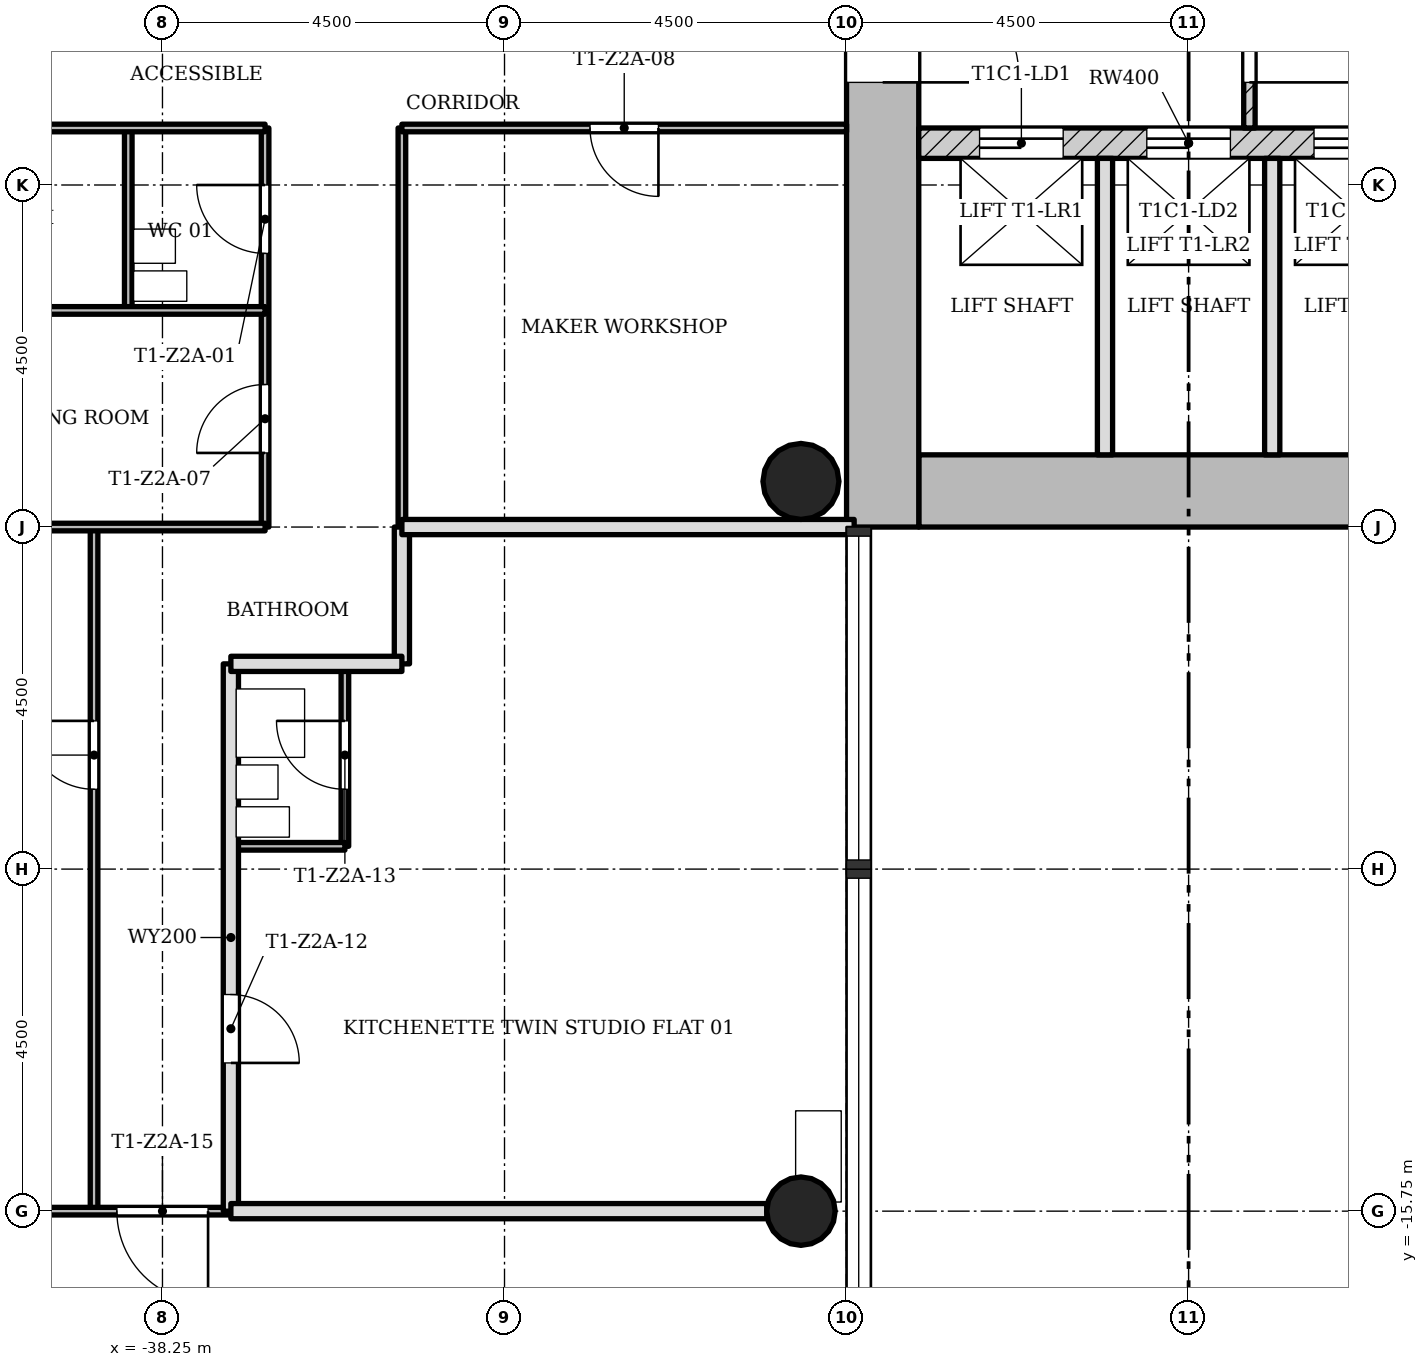
"""IFC4 building model, lengths in metres.
Left out: names, types, materials, properties, quantities, classifications, styles, units other than length and angle.
Written with IfcOpenShell. Run it as: python <this file> out.ifc"""

import sys

from ifc_helpers import new_model, si_unit, direction, frame, frame_2d, origin, origin_2d, place, context, subcontext, project, spatial, rectangle, hollow_circle, extrude, element, fill, save


model = new_model("IFC4")
c1 = context("Model", 3, precision=1e-05, world=origin(), true_north=direction((0.0, 1.0)))
c2 = subcontext(c1, "Body", "Model", "MODEL_VIEW")
j1 = project(units=[si_unit("LENGTHUNIT", "METRE"), si_unit("PLANEANGLEUNIT", "RADIAN")], contexts=[c1])
p1 = place(None, origin())
s1 = spatial("IfcSite", under=j1, at=p1, CompositionType="ELEMENT")
p2 = place(p1, origin())
s2 = spatial("IfcBuilding", under=s1, at=p2, CompositionType="ELEMENT")
p3 = place(p2, frame((0.0, 0.0, 117.4)))
s3 = spatial("IfcBuildingStorey", under=s2, at=p3, CompositionType="ELEMENT", Elevation=117.4)
p4 = place(p3, frame((-28.3, -6.275, 0.0), z_axis=(0.0, 0.0, 1.0), x_axis=(1.0, 0.0, 0.0)))
e1 = element("IfcWall", 1, at=p4, inside=s3, PredefinedType="SHEAR", context=c2, shape_type="SweptSolid", body=[
    extrude(rectangle(XDim=8.05, YDim=0.95, at=frame_2d((4.025, 0.0))), origin(), (0.0, 0.0, 1.0), 3.4),
])
p5 = place(p3, frame((-28.775, 5.8, 0.0), z_axis=(0.0, 0.0, 1.0), x_axis=(0.0, -1.0, 0.0)))
e2 = element("IfcWall", 2, at=p5, inside=s3, PredefinedType="SHEAR", context=c2, shape_type="SweptSolid", body=[
    extrude(rectangle(XDim=12.55, YDim=0.95, at=frame_2d((6.275, 0.0))), origin(), (0.0, 0.0, 1.0), 3.4),
])
p6 = place(p5, frame((4.9, 0.0, 0.0)))
e3 = element("IfcOpeningElement", 3, at=p6, cuts=e2, PredefinedType="OPENING", context=c2, shape_type="SweptSolid", body=[
    extrude(rectangle(XDim=1.8, YDim=2.1, at=frame_2d((0.9, 1.05))), frame((0.0, 0.485, 0.0), z_axis=(0.0, -1.0, 0.0), x_axis=(1.0, 0.0, 0.0)), (0.0, 0.0, 1.0), 0.97),
])
p7 = place(p3, frame((-28.3, -1.7, 0.0), z_axis=(0.0, 0.0, 1.0), x_axis=(1.0, 0.0, 0.0)))
e4 = element("IfcWall", 4, at=p7, inside=s3, PredefinedType="SHEAR", context=c2, shape_type="SweptSolid", body=[
    extrude(rectangle(XDim=7.1, YDim=0.4, at=frame_2d((3.55, 0.0))), origin(), (0.0, 0.0, 1.0), 3.4),
])
p8 = place(p7, frame((0.8, 0.0, 0.0)))
e5 = element("IfcOpeningElement", 5, at=p8, cuts=e4, PredefinedType="OPENING", context=c2, shape_type="SweptSolid", body=[
    extrude(rectangle(XDim=1.1, YDim=2.1, at=frame_2d((0.55, 1.05))), frame((0.0, 0.21, 0.0), z_axis=(0.0, -1.0, 0.0), x_axis=(1.0, 0.0, 0.0)), (0.0, 0.0, 1.0), 0.42),
])
p9 = place(p7, frame((3.0, 0.0, 0.0)))
e6 = element("IfcOpeningElement", 6, at=p9, cuts=e4, PredefinedType="OPENING", context=c2, shape_type="SweptSolid", body=[
    extrude(rectangle(XDim=1.1, YDim=2.1, at=frame_2d((0.55, 1.05))), frame((0.0, 0.21, 0.0), z_axis=(0.0, -1.0, 0.0), x_axis=(1.0, 0.0, 0.0)), (0.0, 0.0, 1.0), 0.42),
])
p10 = place(p7, frame((5.2, 0.0, 0.0)))
e7 = element("IfcOpeningElement", 7, at=p10, cuts=e4, PredefinedType="OPENING", context=c2, shape_type="SweptSolid", body=[
    extrude(rectangle(XDim=1.1, YDim=2.1, at=frame_2d((0.55, 1.05))), frame((0.0, 0.21, 0.0), z_axis=(0.0, -1.0, 0.0), x_axis=(1.0, 0.0, 0.0)), (0.0, 0.0, 1.0), 0.42),
])
p11 = place(p3, frame((-29.85, -15.75, 0.0), z_axis=(0.0, 0.0, 1.0), x_axis=(1.0, 0.0, 0.0)))
e8 = element("IfcColumn", 8, at=p11, inside=s3, PredefinedType="COLUMN", context=c2, shape_type="SweptSolid", body=[
    extrude(hollow_circle(Radius=0.45, WallThickness=0.032, at=origin_2d()), origin(), (0.0, 0.0, 1.0), 3.4),
])
p12 = place(p3, frame((-29.85, -6.15, 0.0), z_axis=(0.0, 0.0, 1.0), x_axis=(1.0, 0.0, 0.0)))
e9 = element("IfcColumn", 9, at=p12, inside=s3, PredefinedType="COLUMN", context=c2, shape_type="SweptSolid", body=[
    extrude(hollow_circle(Radius=0.5, WallThickness=0.036, at=origin_2d()), origin(), (0.0, 0.0, 1.0), 3.4),
])
p13 = place(p3, frame((-23.95, -1.5, 0.0), z_axis=(0.0, 0.0, 1.0), x_axis=(0.0, 1.0, 0.0)))
e10 = element("IfcWall", 10, at=p13, inside=s3, PredefinedType="PARTITIONING", context=c2, shape_type="SweptSolid", body=[
    extrude(rectangle(XDim=3.0, YDim=0.15, at=frame_2d((1.5, 0.0))), origin(), (0.0, 0.0, 1.0), 3.0),
])
p14 = place(p13, frame((0.6, 0.0, 0.0)))
e11 = element("IfcOpeningElement", 11, at=p14, cuts=e10, PredefinedType="OPENING", context=c2, shape_type="SweptSolid", body=[
    extrude(rectangle(XDim=1.8, YDim=2.1, at=frame_2d((0.9, 1.05))), frame((0.0, 0.085, 0.0), z_axis=(0.0, -1.0, 0.0), x_axis=(1.0, 0.0, 0.0)), (0.0, 0.0, 1.0), 0.17),
])
for number, where, z_axis, x_axis in (
    (12, (-25.85, -5.8, 0.0), (0.0, 0.0, 1.0), (0.0, 1.0, 0.0)),
    (13, (-23.65, -5.8, 0.0), (0.0, 0.0, 1.0), (0.0, 1.0, 0.0)),
):
    element("IfcWall", number, at=place(p3, frame(where, z_axis=z_axis, x_axis=x_axis)), inside=s3, PredefinedType="SOLIDWALL", context=c2, shape_type="SweptSolid", body=[
        extrude(rectangle(XDim=3.9, YDim=0.2, at=frame_2d((1.95, 0.0))), origin(), (0.0, 0.0, 1.0), 3.0),
    ])
p15 = place(p3, frame((-39.15, -15.75, 0.0), z_axis=(0.0, 0.0, 1.0), x_axis=(0.0, 1.0, 0.0)))
e14 = element("IfcWall", 14, at=p15, inside=s3, PredefinedType="PARTITIONING", context=c2, shape_type="SweptSolid", body=[
    extrude(rectangle(XDim=9.0, YDim=0.1, at=frame_2d((4.5, 0.0))), origin(), (0.0, 0.0, 1.0), 3.0),
])
p16 = place(p15, frame((5.55, 0.0, 0.0)))
e15 = element("IfcOpeningElement", 15, at=p16, cuts=e14, PredefinedType="OPENING", context=c2, shape_type="SweptSolid", body=[
    extrude(rectangle(XDim=0.9, YDim=2.1, at=frame_2d((0.45, 1.05))), frame((0.0, 0.06, 0.0), z_axis=(0.0, -1.0, 0.0), x_axis=(1.0, 0.0, 0.0)), (0.0, 0.0, 1.0), 0.12),
])
p17 = place(p3, frame((-38.7, -3.9, 0.0), z_axis=(0.0, 0.0, 1.0), x_axis=(0.0, 1.0, 0.0)))
e16 = element("IfcWall", 16, at=p17, inside=s3, PredefinedType="PARTITIONING", context=c2, shape_type="SweptSolid", body=[
    extrude(rectangle(XDim=2.4, YDim=0.1, at=frame_2d((1.2, 0.0))), origin(), (0.0, 0.0, 1.0), 3.0),
])
p18 = place(p3, frame((-37.35, -15.75, 0.0), z_axis=(0.0, 0.0, 1.0), x_axis=(0.0, 1.0, 0.0)))
e17 = element("IfcWall", 17, at=p18, inside=s3, PredefinedType="SOLIDWALL", context=c2, shape_type="SweptSolid", body=[
    extrude(rectangle(XDim=7.2, YDim=0.2, at=frame_2d((3.6, 0.0))), origin(), (0.0, 0.0, 1.0), 3.0),
])
p19 = place(p18, frame((1.95, 0.0, 0.0)))
e18 = element("IfcOpeningElement", 18, at=p19, cuts=e17, PredefinedType="OPENING", context=c2, shape_type="SweptSolid", body=[
    extrude(rectangle(XDim=0.9, YDim=2.1, at=frame_2d((0.45, 1.05))), frame((0.0, 0.11, 0.0), z_axis=(0.0, -1.0, 0.0), x_axis=(1.0, 0.0, 0.0)), (0.0, 0.0, 1.0), 0.22),
])
p20 = place(p3, frame((-36.9, -6.75, 0.0), z_axis=(0.0, 0.0, 1.0), x_axis=(0.0, 1.0, 0.0)))
e19 = element("IfcWall", 19, at=p20, inside=s3, PredefinedType="PARTITIONING", context=c2, shape_type="SweptSolid", body=[
    extrude(rectangle(XDim=5.25, YDim=0.1, at=frame_2d((2.625, 0.0))), origin(), (0.0, 0.0, 1.0), 3.0),
])
p21 = place(p20, frame((3.6, 0.0, 0.0)))
e20 = element("IfcOpeningElement", 20, at=p21, cuts=e19, PredefinedType="OPENING", context=c2, shape_type="SweptSolid", body=[
    extrude(rectangle(XDim=0.9, YDim=2.1, at=frame_2d((0.45, 1.05))), frame((0.0, 0.06, 0.0), z_axis=(0.0, -1.0, 0.0), x_axis=(1.0, 0.0, 0.0)), (0.0, 0.0, 1.0), 0.12),
])
p22 = place(p20, frame((0.975, 0.0, 0.0)))
e21 = element("IfcOpeningElement", 21, at=p22, cuts=e19, PredefinedType="OPENING", context=c2, shape_type="SweptSolid", body=[
    extrude(rectangle(XDim=0.9, YDim=2.1, at=frame_2d((0.45, 1.05))), frame((0.0, 0.06, 0.0), z_axis=(0.0, -1.0, 0.0), x_axis=(1.0, 0.0, 0.0)), (0.0, 0.0, 1.0), 0.12),
])
p23 = place(p3, frame((-35.85, -10.95, 0.0), z_axis=(0.0, 0.0, 1.0), x_axis=(0.0, 1.0, 0.0)))
e22 = element("IfcWall", 22, at=p23, inside=s3, PredefinedType="PARTITIONING", context=c2, shape_type="SweptSolid", body=[
    extrude(rectangle(XDim=2.4, YDim=0.1, at=frame_2d((1.2, 0.0))), origin(), (0.0, 0.0, 1.0), 3.0),
])
p24 = place(p23, frame((0.75, 0.0, 0.0)))
e23 = element("IfcOpeningElement", 23, at=p24, cuts=e22, PredefinedType="OPENING", context=c2, shape_type="SweptSolid", body=[
    extrude(rectangle(XDim=0.9, YDim=2.1, at=frame_2d((0.45, 1.05))), frame((0.0, 0.06, 0.0), z_axis=(0.0, -1.0, 0.0), x_axis=(1.0, 0.0, 0.0)), (0.0, 0.0, 1.0), 0.12),
])
p25 = place(p3, frame((-35.1, -6.75, 0.0), z_axis=(0.0, 0.0, 1.0), x_axis=(0.0, 1.0, 0.0)))
e24 = element("IfcWall", 24, at=p25, inside=s3, PredefinedType="PARTITIONING", context=c2, shape_type="SweptSolid", body=[
    extrude(rectangle(XDim=5.25, YDim=0.1, at=frame_2d((2.625, 0.0))), origin(), (0.0, 0.0, 1.0), 3.0),
])
p26 = place(p3, frame((-35.1, -8.55, 0.0), z_axis=(0.0, 0.0, 1.0), x_axis=(0.0, 1.0, 0.0)))
e25 = element("IfcWall", 25, at=p26, inside=s3, PredefinedType="SOLIDWALL", context=c2, shape_type="SweptSolid", body=[
    extrude(rectangle(XDim=1.8, YDim=0.2, at=frame_2d((0.9, 0.0))), origin(), (0.0, 0.0, 1.0), 3.0),
])
p27 = place(p3, frame((-41.7, -15.75, 0.0), z_axis=(0.0, 0.0, 1.0), x_axis=(1.0, 0.0, 0.0)))
e26 = element("IfcWall", 26, at=p27, inside=s3, PredefinedType="PARTITIONING", context=c2, shape_type="SweptSolid", body=[
    extrude(rectangle(XDim=4.35, YDim=0.1, at=frame_2d((2.175, 0.0))), origin(), (0.0, 0.0, 1.0), 3.0),
])
p28 = place(p27, frame((2.85, 0.0, 0.0)))
e27 = element("IfcOpeningElement", 27, at=p28, cuts=e26, PredefinedType="OPENING", context=c2, shape_type="SweptSolid", body=[
    extrude(rectangle(XDim=1.2, YDim=2.1, at=frame_2d((0.6, 1.05))), frame((0.0, 0.06, 0.0), z_axis=(0.0, -1.0, 0.0), x_axis=(1.0, 0.0, 0.0)), (0.0, 0.0, 1.0), 0.12),
])
p29 = place(p3, frame((-37.35, -15.75, 0.0), z_axis=(0.0, 0.0, 1.0), x_axis=(1.0, 0.0, 0.0)))
e28 = element("IfcWall", 28, at=p29, inside=s3, PredefinedType="SOLIDWALL", context=c2, shape_type="SweptSolid", body=[
    extrude(rectangle(XDim=7.05, YDim=0.2, at=frame_2d((3.525, 0.0))), origin(), (0.0, 0.0, 1.0), 3.0),
])
p30 = place(p3, frame((-37.35, -10.95, 0.0), z_axis=(0.0, 0.0, 1.0), x_axis=(1.0, 0.0, 0.0)))
e29 = element("IfcWall", 29, at=p30, inside=s3, PredefinedType="PARTITIONING", context=c2, shape_type="SweptSolid", body=[
    extrude(rectangle(XDim=1.5, YDim=0.1, at=frame_2d((0.75, 0.0))), origin(), (0.0, 0.0, 1.0), 3.0),
])
p31 = place(p3, frame((-37.35, -8.55, 0.0), z_axis=(0.0, 0.0, 1.0), x_axis=(1.0, 0.0, 0.0)))
e30 = element("IfcWall", 30, at=p31, inside=s3, PredefinedType="SOLIDWALL", context=c2, shape_type="SweptSolid", body=[
    extrude(rectangle(XDim=2.25, YDim=0.2, at=frame_2d((1.125, 0.0))), origin(), (0.0, 0.0, 1.0), 3.0),
])
p32 = place(p3, frame((-42.85, -6.75, 0.0), z_axis=(0.0, 0.0, 1.0), x_axis=(1.0, 0.0, 0.0)))
e31 = element("IfcWall", 31, at=p32, inside=s3, PredefinedType="PARTITIONING", context=c2, shape_type="SweptSolid", body=[
    extrude(rectangle(XDim=5.95, YDim=0.1, at=frame_2d((2.975, 0.0))), origin(), (0.0, 0.0, 1.0), 3.0),
])
p33 = place(p3, frame((-35.1, -6.75, 0.0), z_axis=(0.0, 0.0, 1.0), x_axis=(1.0, 0.0, 0.0)))
e32 = element("IfcWall", 32, at=p33, inside=s3, PredefinedType="SOLIDWALL", context=c2, shape_type="SweptSolid", body=[
    extrude(rectangle(XDim=5.95, YDim=0.2, at=frame_2d((2.975, 0.0))), origin(), (0.0, 0.0, 1.0), 3.0),
])
p34 = place(p3, frame((-42.75, -3.9, 0.0), z_axis=(0.0, 0.0, 1.0), x_axis=(1.0, 0.0, 0.0)))
e33 = element("IfcWall", 33, at=p34, inside=s3, PredefinedType="PARTITIONING", context=c2, shape_type="SweptSolid", body=[
    extrude(rectangle(XDim=5.85, YDim=0.1, at=frame_2d((2.925, 0.0))), origin(), (0.0, 0.0, 1.0), 3.0),
])
p35 = place(p3, frame((-42.75, -1.5, 0.0), z_axis=(0.0, 0.0, 1.0), x_axis=(1.0, 0.0, 0.0)))
e34 = element("IfcWall", 34, at=p35, inside=s3, PredefinedType="PARTITIONING", context=c2, shape_type="SweptSolid", body=[
    extrude(rectangle(XDim=5.85, YDim=0.1, at=frame_2d((2.925, 0.0))), origin(), (0.0, 0.0, 1.0), 3.0),
])
p36 = place(p35, frame((1.575, 0.0, 0.0)))
e35 = element("IfcOpeningElement", 35, at=p36, cuts=e34, PredefinedType="OPENING", context=c2, shape_type="SweptSolid", body=[
    extrude(rectangle(XDim=0.9, YDim=2.1, at=frame_2d((0.45, 1.05))), frame((0.0, 0.06, 0.0), z_axis=(0.0, -1.0, 0.0), x_axis=(1.0, 0.0, 0.0)), (0.0, 0.0, 1.0), 0.12),
])
p37 = place(p3, frame((-35.1, -1.5, 0.0), z_axis=(0.0, 0.0, 1.0), x_axis=(1.0, 0.0, 0.0)))
e36 = element("IfcWall", 36, at=p37, inside=s3, PredefinedType="PARTITIONING", context=c2, shape_type="SweptSolid", body=[
    extrude(rectangle(XDim=5.85, YDim=0.1, at=frame_2d((2.925, 0.0))), origin(), (0.0, 0.0, 1.0), 3.0),
])
p38 = place(p37, frame((2.475, 0.0, 0.0)))
e37 = element("IfcOpeningElement", 37, at=p38, cuts=e36, PredefinedType="OPENING", context=c2, shape_type="SweptSolid", body=[
    extrude(rectangle(XDim=0.9, YDim=2.1, at=frame_2d((0.45, 1.05))), frame((0.0, 0.06, 0.0), z_axis=(0.0, -1.0, 0.0), x_axis=(1.0, 0.0, 0.0)), (0.0, 0.0, 1.0), 0.12),
])
p39 = place(p14, origin())
e38 = element("IfcDoor", 38, at=p39, inside=s3, OperationType="SINGLE_SWING_LEFT", PredefinedType="DOOR", context=c2, shape_type="SweptSolid", body=[
    extrude(rectangle(XDim=1.8, YDim=2.1, at=frame_2d((0.9, 1.05))), frame((0.0, 0.025, 0.0), z_axis=(0.0, -1.0, 0.0), x_axis=(1.0, 0.0, 0.0)), (0.0, 0.0, 1.0), 0.05),
])
fill(e11, e38)
p40 = place(p21, origin())
e39 = element("IfcDoor", 39, at=p40, inside=s3, OperationType="SINGLE_SWING_LEFT", PredefinedType="DOOR", context=c2, shape_type="SweptSolid", body=[
    extrude(rectangle(XDim=0.9, YDim=2.1, at=frame_2d((0.45, 1.05))), frame((0.0, 0.025, 0.0), z_axis=(0.0, -1.0, 0.0), x_axis=(1.0, 0.0, 0.0)), (0.0, 0.0, 1.0), 0.05),
])
fill(e20, e39)
p41 = place(p22, origin())
e40 = element("IfcDoor", 40, at=p41, inside=s3, OperationType="SINGLE_SWING_RIGHT", PredefinedType="DOOR", context=c2, shape_type="SweptSolid", body=[
    extrude(rectangle(XDim=0.9, YDim=2.1, at=frame_2d((0.45, 1.05))), frame((0.0, 0.025, 0.0), z_axis=(0.0, -1.0, 0.0), x_axis=(1.0, 0.0, 0.0)), (0.0, 0.0, 1.0), 0.05),
])
fill(e21, e40)
p42 = place(p38, origin())
e41 = element("IfcDoor", 41, at=p42, inside=s3, OperationType="SINGLE_SWING_RIGHT", PredefinedType="DOOR", context=c2, shape_type="SweptSolid", body=[
    extrude(rectangle(XDim=0.9, YDim=2.1, at=frame_2d((0.45, 1.05))), frame((0.0, 0.025, 0.0), z_axis=(0.0, -1.0, 0.0), x_axis=(1.0, 0.0, 0.0)), (0.0, 0.0, 1.0), 0.05),
])
fill(e37, e41)
p43 = place(p19, origin())
e42 = element("IfcDoor", 42, at=p43, inside=s3, OperationType="SINGLE_SWING_LEFT", PredefinedType="DOOR", context=c2, shape_type="SweptSolid", body=[
    extrude(rectangle(XDim=0.9, YDim=2.1, at=frame_2d((0.45, 1.05))), frame((0.0, 0.025, 0.0), z_axis=(0.0, -1.0, 0.0), x_axis=(1.0, 0.0, 0.0)), (0.0, 0.0, 1.0), 0.05),
])
fill(e18, e42)
p44 = place(p24, origin())
e43 = element("IfcDoor", 43, at=p44, inside=s3, OperationType="SINGLE_SWING_LEFT", PredefinedType="DOOR", context=c2, shape_type="SweptSolid", body=[
    extrude(rectangle(XDim=0.9, YDim=2.1, at=frame_2d((0.45, 1.05))), frame((0.0, 0.025, 0.0), z_axis=(0.0, -1.0, 0.0), x_axis=(1.0, 0.0, 0.0)), (0.0, 0.0, 1.0), 0.05),
])
fill(e23, e43)
p45 = place(p16, origin())
e44 = element("IfcDoor", 44, at=p45, inside=s3, OperationType="SINGLE_SWING_LEFT", PredefinedType="DOOR", context=c2, shape_type="SweptSolid", body=[
    extrude(rectangle(XDim=0.9, YDim=2.1, at=frame_2d((0.45, 1.05))), frame((0.0, 0.025, 0.0), z_axis=(0.0, -1.0, 0.0), x_axis=(1.0, 0.0, 0.0)), (0.0, 0.0, 1.0), 0.05),
])
fill(e15, e44)
p46 = place(p28, origin())
e45 = element("IfcDoor", 45, at=p46, inside=s3, OperationType="SINGLE_SWING_RIGHT", PredefinedType="DOOR", context=c2, shape_type="SweptSolid", body=[
    extrude(rectangle(XDim=1.2, YDim=2.1, at=frame_2d((0.6, 1.05))), frame((0.0, 0.025, 0.0), z_axis=(0.0, -1.0, 0.0), x_axis=(1.0, 0.0, 0.0)), (0.0, 0.0, 1.0), 0.05),
])
fill(e27, e45)
p47 = place(p8, origin())
e46 = element("IfcDoor", 46, at=p47, inside=s3, OperationType="SLIDING_TO_LEFT", PredefinedType="DOOR", context=c2, shape_type="SweptSolid", body=[
    extrude(rectangle(XDim=1.1, YDim=2.1, at=frame_2d((0.55, 1.05))), frame((0.0, 0.025, 0.0), z_axis=(0.0, -1.0, 0.0), x_axis=(1.0, 0.0, 0.0)), (0.0, 0.0, 1.0), 0.05),
])
fill(e5, e46)
p48 = place(p9, origin())
e47 = element("IfcDoor", 47, at=p48, inside=s3, OperationType="SLIDING_TO_LEFT", PredefinedType="DOOR", context=c2, shape_type="SweptSolid", body=[
    extrude(rectangle(XDim=1.1, YDim=2.1, at=frame_2d((0.55, 1.05))), frame((0.0, 0.025, 0.0), z_axis=(0.0, -1.0, 0.0), x_axis=(1.0, 0.0, 0.0)), (0.0, 0.0, 1.0), 0.05),
])
fill(e6, e47)
p49 = place(p10, origin())
e48 = element("IfcDoor", 48, at=p49, inside=s3, OperationType="SLIDING_TO_LEFT", PredefinedType="DOOR", context=c2, shape_type="SweptSolid", body=[
    extrude(rectangle(XDim=1.1, YDim=2.1, at=frame_2d((0.55, 1.05))), frame((0.0, 0.025, 0.0), z_axis=(0.0, -1.0, 0.0), x_axis=(1.0, 0.0, 0.0)), (0.0, 0.0, 1.0), 0.05),
])
fill(e7, e48)
p50 = place(p6, origin())
e49 = element("IfcDoor", 49, at=p50, inside=s3, OperationType="SINGLE_SWING_LEFT", PredefinedType="DOOR", context=c2, shape_type="SweptSolid", body=[
    extrude(rectangle(XDim=1.8, YDim=2.1, at=frame_2d((0.9, 1.05))), frame((0.0, 0.025, 0.0), z_axis=(0.0, -1.0, 0.0), x_axis=(1.0, 0.0, 0.0)), (0.0, 0.0, 1.0), 0.05),
])
fill(e3, e49)
save(model, sys.argv[1])
